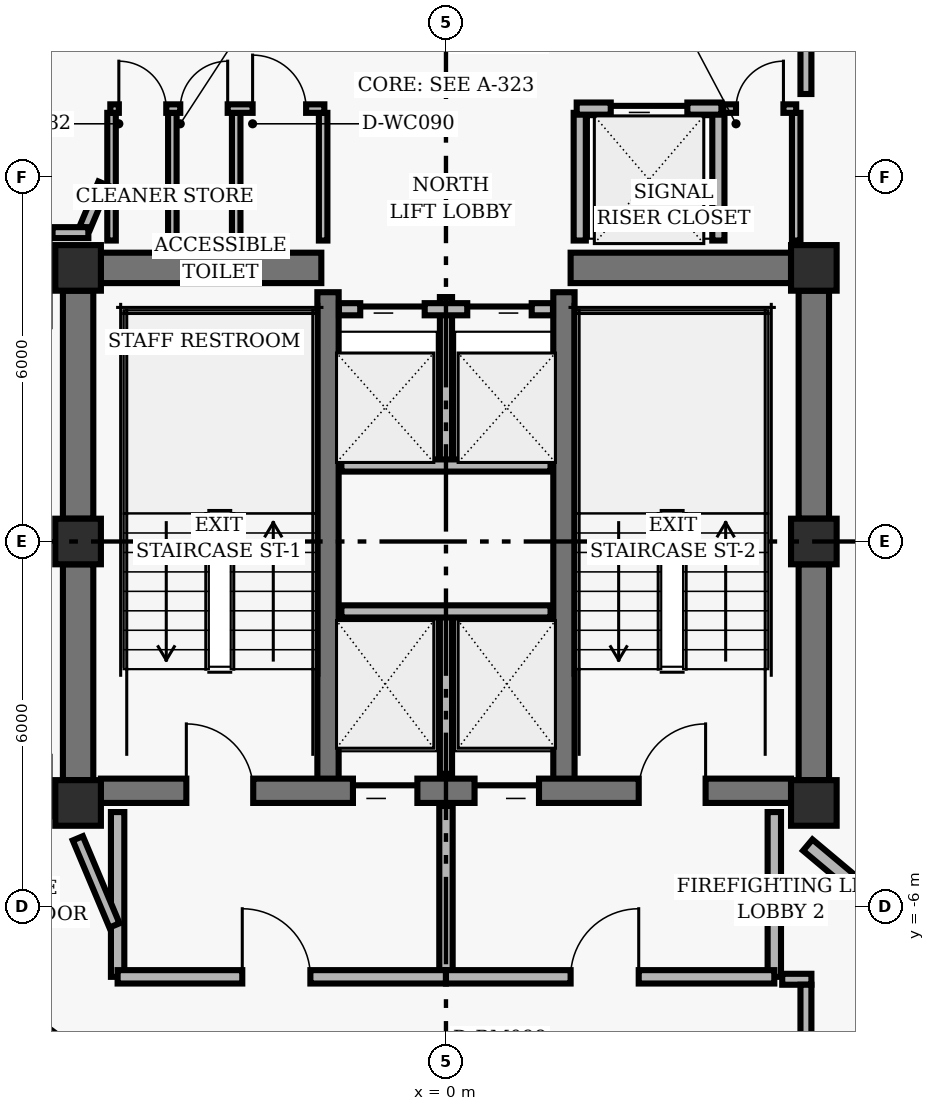
"""IFC4 building model, lengths in metres.
Left out: names, types, materials, properties, quantities, classifications, styles, units other than length and angle.
Written with IfcOpenShell. Run it as: python <this file> out.ifc"""

import sys

from ifc_helpers import new_model, si_unit, direction, frame, frame_2d, origin, origin_2d, place, context, subcontext, project, spatial, rectangle, hollow_rectangle, extrude, element, fill, save


model = new_model("IFC4")
c1 = context("Model", 3, precision=1e-05, world=origin(), true_north=direction((0.0, 1.0)))
c2 = subcontext(c1, "Body", "Model", "MODEL_VIEW")
j1 = project(units=[si_unit("LENGTHUNIT", "METRE"), si_unit("PLANEANGLEUNIT", "RADIAN")], contexts=[c1])
p1 = place(None, origin())
s1 = spatial("IfcSite", under=j1, at=p1, CompositionType="ELEMENT")
p2 = place(p1, origin())
s2 = spatial("IfcBuilding", under=s1, at=p2, CompositionType="ELEMENT")
p3 = place(p2, frame((0.0, 0.0, 236.16)))
s3 = spatial("IfcBuildingStorey", under=s2, at=p3, CompositionType="ELEMENT", Elevation=236.16)
for number, where, z_axis, x_axis in (
    (1, (-6.05, 4.5, 0.0), (0.0, 0.0, 1.0), (1.0, 0.0, 0.0)),
    (2, (6.05, 4.5, 0.0), (0.0, 0.0, 1.0), (1.0, 0.0, 0.0)),
    (3, (-6.05, 0.0, 0.0), (0.0, 0.0, 1.0), (1.0, 0.0, 0.0)),
    (4, (6.05, 0.0, 0.0), (0.0, 0.0, 1.0), (1.0, 0.0, 0.0)),
    (5, (-6.05, -4.3, 0.0), (0.0, 0.0, 1.0), (1.0, 0.0, 0.0)),
    (6, (6.05, -4.3, 0.0), (0.0, 0.0, 1.0), (1.0, 0.0, 0.0)),
):
    element("IfcColumn", number, at=place(p3, frame(where, z_axis=z_axis, x_axis=x_axis)), inside=s3, PredefinedType="COLUMN", context=c2, shape_type="SweptSolid", body=[
        extrude(hollow_rectangle(XDim=0.75, YDim=0.75, WallThickness=0.05, InnerFilletRadius=0.02, OuterFilletRadius=0.04, at=origin_2d()), origin(), (0.0, 0.0, 1.0), 3.04),
    ])
p4 = place(p3, frame((-6.05, 0.375, 0.0), z_axis=(0.0, 0.0, 1.0), x_axis=(0.0, 1.0, 0.0)))
e7 = element("IfcWall", 7, at=p4, inside=s3, PredefinedType="SHEAR", context=c2, shape_type="SweptSolid", body=[
    extrude(rectangle(XDim=3.75, YDim=0.5, at=frame_2d((1.875, 0.0))), origin(), (0.0, 0.0, 1.0), 2.618),
])
p5 = place(p3, frame((-6.05, -3.925, 0.0), z_axis=(0.0, 0.0, 1.0), x_axis=(0.0, 1.0, 0.0)))
e8 = element("IfcWall", 8, at=p5, inside=s3, PredefinedType="SHEAR", context=c2, shape_type="SweptSolid", body=[
    extrude(rectangle(XDim=3.55, YDim=0.5, at=frame_2d((1.775, 0.0))), origin(), (0.0, 0.0, 1.0), 2.618),
])
p6 = place(p3, frame((6.05, 0.375, 0.0), z_axis=(0.0, 0.0, 1.0), x_axis=(0.0, 1.0, 0.0)))
e9 = element("IfcWall", 9, at=p6, inside=s3, PredefinedType="SHEAR", context=c2, shape_type="SweptSolid", body=[
    extrude(rectangle(XDim=3.75, YDim=0.5, at=frame_2d((1.875, 0.0))), origin(), (0.0, 0.0, 1.0), 2.618),
])
p7 = place(p3, frame((6.05, -3.925, 0.0), z_axis=(0.0, 0.0, 1.0), x_axis=(0.0, 1.0, 0.0)))
e10 = element("IfcWall", 10, at=p7, inside=s3, PredefinedType="SHEAR", context=c2, shape_type="SweptSolid", body=[
    extrude(rectangle(XDim=3.55, YDim=0.5, at=frame_2d((1.775, 0.0))), origin(), (0.0, 0.0, 1.0), 2.618),
])
for number, where, z_axis, x_axis in (
    (11, (-1.94, -4.1, 0.0), (0.0, 0.0, 1.0), (0.0, 1.0, 0.0)),
    (12, (1.94, -4.1, 0.0), (0.0, 0.0, 1.0), (0.0, 1.0, 0.0)),
):
    element("IfcWall", number, at=place(p3, frame(where, z_axis=z_axis, x_axis=x_axis)), inside=s3, PredefinedType="SHEAR", context=c2, shape_type="SweptSolid", body=[
        extrude(rectangle(XDim=8.2, YDim=0.35, at=frame_2d((4.1, 0.0))), origin(), (0.0, 0.0, 1.0), 2.618),
    ])
p8 = place(p3, frame((-5.675, -4.1, 0.0), z_axis=(0.0, 0.0, 1.0), x_axis=(1.0, 0.0, 0.0)))
e13 = element("IfcWall", 13, at=p8, inside=s3, PredefinedType="SHEAR", context=c2, shape_type="SweptSolid", body=[
    extrude(rectangle(XDim=11.35, YDim=0.4, at=frame_2d((5.675, 0.0))), origin(), (0.0, 0.0, 1.0), 2.618),
])
p9 = place(p8, frame((1.405, 0.0, 0.0)))
e14 = element("IfcOpeningElement", 14, at=p9, cuts=e13, PredefinedType="OPENING", context=c2, shape_type="SweptSolid", body=[
    extrude(rectangle(XDim=1.1, YDim=2.04, at=frame_2d((0.55, 1.02))), frame((0.0, 0.21, 0.0), z_axis=(0.0, -1.0, 0.0), x_axis=(1.0, 0.0, 0.0)), (0.0, 0.0, 1.0), 0.42),
])
p10 = place(p8, frame((8.845, 0.0, 0.0)))
e15 = element("IfcOpeningElement", 15, at=p10, cuts=e13, PredefinedType="OPENING", context=c2, shape_type="SweptSolid", body=[
    extrude(rectangle(XDim=1.1, YDim=2.04, at=frame_2d((0.55, 1.02))), frame((0.0, 0.21, 0.0), z_axis=(0.0, -1.0, 0.0), x_axis=(1.0, 0.0, 0.0)), (0.0, 0.0, 1.0), 0.42),
])
p11 = place(p8, frame((4.145, 0.0, 0.0)))
e16 = element("IfcOpeningElement", 16, at=p11, cuts=e13, PredefinedType="OPENING", context=c2, shape_type="SweptSolid", body=[
    extrude(rectangle(XDim=1.06, YDim=2.04, at=frame_2d((0.53, 1.02))), frame((0.0, 0.21, 0.0), z_axis=(0.0, -1.0, 0.0), x_axis=(1.0, 0.0, 0.0)), (0.0, 0.0, 1.0), 0.42),
])
p12 = place(p8, frame((6.145, 0.0, 0.0)))
e17 = element("IfcOpeningElement", 17, at=p12, cuts=e13, PredefinedType="OPENING", context=c2, shape_type="SweptSolid", body=[
    extrude(rectangle(XDim=1.06, YDim=2.04, at=frame_2d((0.53, 1.02))), frame((0.0, 0.21, 0.0), z_axis=(0.0, -1.0, 0.0), x_axis=(1.0, 0.0, 0.0)), (0.0, 0.0, 1.0), 0.42),
])
for number, where, z_axis, x_axis in (
    (18, (-5.675, 4.5, 0.0), (0.0, 0.0, 1.0), (1.0, 0.0, 0.0)),
    (19, (2.05, 4.5, 0.0), (0.0, 0.0, 1.0), (1.0, 0.0, 0.0)),
):
    element("IfcWall", number, at=place(p3, frame(where, z_axis=z_axis, x_axis=x_axis)), inside=s3, PredefinedType="SHEAR", context=c2, shape_type="SweptSolid", body=[
        extrude(rectangle(XDim=3.625, YDim=0.5, at=frame_2d((1.812, 0.0))), origin(), (0.0, 0.0, 1.0), 2.618),
    ])
p13 = place(p3, frame((0.0, -3.82, 0.0), z_axis=(0.0, 0.0, 1.0), x_axis=(0.0, 1.0, 0.0)))
e20 = element("IfcWall", 20, at=p13, inside=s3, PredefinedType="PARTITIONING", context=c2, shape_type="SweptSolid", body=[
    extrude(rectangle(XDim=2.67, YDim=0.2, at=frame_2d((1.335, 0.0))), origin(), (0.0, 0.0, 1.0), 2.593),
])
p14 = place(p3, frame((-1.72, -1.15, 0.0), z_axis=(0.0, 0.0, 1.0), x_axis=(1.0, 0.0, 0.0)))
e21 = element("IfcWall", 21, at=p14, inside=s3, PredefinedType="PARTITIONING", context=c2, shape_type="SweptSolid", body=[
    extrude(rectangle(XDim=3.44, YDim=0.2, at=frame_2d((1.72, 0.0))), origin(), (0.0, 0.0, 1.0), 2.593),
])
for number, where, z_axis, x_axis in (
    (22, (-5.4, -7.16, 0.0), (0.0, 0.0, 1.0), (0.0, 1.0, 0.0)),
    (23, (5.4, -7.16, 0.0), (0.0, 0.0, 1.0), (0.0, 1.0, 0.0)),
):
    element("IfcWall", number, at=place(p3, frame(where, z_axis=z_axis, x_axis=x_axis)), inside=s3, PredefinedType="PARTITIONING", context=c2, shape_type="SweptSolid", body=[
        extrude(rectangle(XDim=2.71, YDim=0.22, at=frame_2d((1.355, 0.0))), origin(), (0.0, 0.0, 1.0), 2.593),
    ])
p15 = place(p3, frame((0.0, -7.16, 0.0), z_axis=(0.0, 0.0, 1.0), x_axis=(0.0, 1.0, 0.0)))
e24 = element("IfcWall", 24, at=p15, inside=s3, PredefinedType="PARTITIONING", context=c2, shape_type="SweptSolid", body=[
    extrude(rectangle(XDim=2.81, YDim=0.22, at=frame_2d((1.405, 0.0))), origin(), (0.0, 0.0, 1.0), 2.593),
])
p16 = place(p3, frame((-5.4, -7.16, 0.0), z_axis=(0.0, 0.0, 1.0), x_axis=(1.0, 0.0, 0.0)))
e25 = element("IfcWall", 25, at=p16, inside=s3, PredefinedType="PARTITIONING", context=c2, shape_type="SweptSolid", body=[
    extrude(rectangle(XDim=5.4, YDim=0.22, at=frame_2d((2.7, 0.0))), origin(), (0.0, 0.0, 1.0), 2.215),
])
p17 = place(p16, frame((2.05, 0.0, 0.0)))
e26 = element("IfcOpeningElement", 26, at=p17, cuts=e25, PredefinedType="OPENING", context=c2, shape_type="SweptSolid", body=[
    extrude(rectangle(XDim=1.12, YDim=2.02, at=frame_2d((0.56, 1.01))), frame((0.0, 0.12, 0.0), z_axis=(0.0, -1.0, 0.0), x_axis=(1.0, 0.0, 0.0)), (0.0, 0.0, 1.0), 0.24),
])
p18 = place(p3, frame((0.0, -7.16, 0.0), z_axis=(0.0, 0.0, 1.0), x_axis=(1.0, 0.0, 0.0)))
e27 = element("IfcWall", 27, at=p18, inside=s3, PredefinedType="PARTITIONING", context=c2, shape_type="SweptSolid", body=[
    extrude(rectangle(XDim=5.4, YDim=0.22, at=frame_2d((2.7, 0.0))), origin(), (0.0, 0.0, 1.0), 2.593),
])
p19 = place(p18, frame((2.05, 0.0, 0.0)))
e28 = element("IfcOpeningElement", 28, at=p19, cuts=e27, PredefinedType="OPENING", context=c2, shape_type="SweptSolid", body=[
    extrude(rectangle(XDim=1.12, YDim=2.02, at=frame_2d((0.56, 1.01))), frame((0.0, 0.12, 0.0), z_axis=(0.0, -1.0, 0.0), x_axis=(1.0, 0.0, 0.0)), (0.0, 0.0, 1.0), 0.24),
])
p20 = place(p3, frame((0.0, 1.25, 0.0), z_axis=(0.0, 0.0, 1.0), x_axis=(0.0, 1.0, 0.0)))
e29 = element("IfcWall", 29, at=p20, inside=s3, PredefinedType="PARTITIONING", context=c2, shape_type="SweptSolid", body=[
    extrude(rectangle(XDim=2.77, YDim=0.2, at=frame_2d((1.385, 0.0))), origin(), (0.0, 0.0, 1.0), 2.593),
])
p21 = place(p3, frame((-1.72, 1.25, 0.0), z_axis=(0.0, 0.0, 1.0), x_axis=(1.0, 0.0, 0.0)))
e30 = element("IfcWall", 30, at=p21, inside=s3, PredefinedType="PARTITIONING", context=c2, shape_type="SweptSolid", body=[
    extrude(rectangle(XDim=3.44, YDim=0.2, at=frame_2d((1.72, 0.0))), origin(), (0.0, 0.0, 1.0), 2.593),
])
p22 = place(p3, frame((-1.76, 3.82, 0.0), z_axis=(0.0, 0.0, 1.0), x_axis=(1.0, 0.0, 0.0)))
e31 = element("IfcWall", 31, at=p22, inside=s3, PredefinedType="PARTITIONING", context=c2, shape_type="SweptSolid", body=[
    extrude(rectangle(XDim=3.52, YDim=0.2, at=frame_2d((1.76, 0.0))), origin(), (0.0, 0.0, 1.0), 2.593),
])
p23 = place(p22, frame((0.35, 0.0, 0.0)))
e32 = element("IfcOpeningElement", 32, at=p23, cuts=e31, PredefinedType="OPENING", context=c2, shape_type="SweptSolid", body=[
    extrude(rectangle(XDim=1.06, YDim=2.04, at=frame_2d((0.53, 1.02))), frame((0.0, 0.11, 0.0), z_axis=(0.0, -1.0, 0.0), x_axis=(1.0, 0.0, 0.0)), (0.0, 0.0, 1.0), 0.22),
])
p24 = place(p22, frame((2.11, 0.0, 0.0)))
e33 = element("IfcOpeningElement", 33, at=p24, cuts=e31, PredefinedType="OPENING", context=c2, shape_type="SweptSolid", body=[
    extrude(rectangle(XDim=1.06, YDim=2.04, at=frame_2d((0.53, 1.02))), frame((0.0, 0.11, 0.0), z_axis=(0.0, -1.0, 0.0), x_axis=(1.0, 0.0, 0.0)), (0.0, 0.0, 1.0), 0.22),
])
for number, where, z_axis, x_axis in (
    (34, (2.2, 4.95, 0.0), (0.0, 0.0, 1.0), (0.0, 1.0, 0.0)),
    (35, (4.48, 4.95, 0.0), (0.0, 0.0, 1.0), (0.0, 1.0, 0.0)),
):
    element("IfcWall", number, at=place(p3, frame(where, z_axis=z_axis, x_axis=x_axis)), inside=s3, PredefinedType="PARTITIONING", context=c2, shape_type="SweptSolid", body=[
        extrude(rectangle(XDim=2.1, YDim=0.2, at=frame_2d((1.05, 0.0))), origin(), (0.0, 0.0, 1.0), 2.593),
    ])
p25 = place(p3, frame((2.15, 7.12, 0.0), z_axis=(0.0, 0.0, 1.0), x_axis=(1.0, 0.0, 0.0)))
e36 = element("IfcWall", 36, at=p25, inside=s3, PredefinedType="PARTITIONING", context=c2, shape_type="SweptSolid", body=[
    extrude(rectangle(XDim=2.38, YDim=0.2, at=frame_2d((1.19, 0.0))), origin(), (0.0, 0.0, 1.0), 2.215),
])
p26 = place(p25, frame((0.56, 0.0, 0.0)))
e37 = element("IfcOpeningElement", 37, at=p26, cuts=e36, PredefinedType="OPENING", context=c2, shape_type="SweptSolid", body=[
    extrude(rectangle(XDim=1.26, YDim=2.06, at=frame_2d((0.63, 1.03))), frame((0.0, 0.11, 0.0), z_axis=(0.0, -1.0, 0.0), x_axis=(1.0, 0.0, 0.0)), (0.0, 0.0, 1.0), 0.22),
])
for number, where, z_axis, x_axis in (
    (38, (-5.5, 4.95, 0.0), (0.0, 0.0, 1.0), (0.0, 1.0, 0.0)),
    (39, (-4.5, 4.95, 0.0), (0.0, 0.0, 1.0), (0.0, 1.0, 0.0)),
    (40, (-3.45, 4.95, 0.0), (0.0, 0.0, 1.0), (0.0, 1.0, 0.0)),
    (41, (-2.02, 4.95, 0.0), (0.0, 0.0, 1.0), (0.0, 1.0, 0.0)),
):
    element("IfcWall", number, at=place(p3, frame(where, z_axis=z_axis, x_axis=x_axis)), inside=s3, PredefinedType="PARTITIONING", context=c2, shape_type="SweptSolid", body=[
        extrude(rectangle(XDim=2.1, YDim=0.14, at=frame_2d((1.05, 0.0))), origin(), (0.0, 0.0, 1.0), 2.593),
    ])
p27 = place(p3, frame((-5.52, 7.12, 0.0), z_axis=(0.0, 0.0, 1.0), x_axis=(1.0, 0.0, 0.0)))
e42 = element("IfcWall", 42, at=p27, inside=s3, PredefinedType="PARTITIONING", context=c2, shape_type="SweptSolid", body=[
    extrude(rectangle(XDim=3.52, YDim=0.14, at=frame_2d((1.76, 0.0))), origin(), (0.0, 0.0, 1.0), 2.215),
])
p28 = place(p27, frame((0.14, 0.0, 0.0)))
e43 = element("IfcOpeningElement", 43, at=p28, cuts=e42, PredefinedType="OPENING", context=c2, shape_type="SweptSolid", body=[
    extrude(rectangle(XDim=0.78, YDim=2.01, at=frame_2d((0.39, 1.005))), frame((0.0, 0.08, 0.0), z_axis=(0.0, -1.0, 0.0), x_axis=(1.0, 0.0, 0.0)), (0.0, 0.0, 1.0), 0.16),
])
p29 = place(p27, frame((1.15, 0.0, 0.0)))
e44 = element("IfcOpeningElement", 44, at=p29, cuts=e42, PredefinedType="OPENING", context=c2, shape_type="SweptSolid", body=[
    extrude(rectangle(XDim=0.78, YDim=2.01, at=frame_2d((0.39, 1.005))), frame((0.0, 0.08, 0.0), z_axis=(0.0, -1.0, 0.0), x_axis=(1.0, 0.0, 0.0)), (0.0, 0.0, 1.0), 0.16),
])
p30 = place(p27, frame((2.34, 0.0, 0.0)))
e45 = element("IfcOpeningElement", 45, at=p30, cuts=e42, PredefinedType="OPENING", context=c2, shape_type="SweptSolid", body=[
    extrude(rectangle(XDim=0.88, YDim=2.02, at=frame_2d((0.44, 1.01))), frame((0.0, 0.08, 0.0), z_axis=(0.0, -1.0, 0.0), x_axis=(1.0, 0.0, 0.0)), (0.0, 0.0, 1.0), 0.16),
])
p31 = place(p3, frame((5.76, 4.95, 0.0), z_axis=(0.0, 0.0, 1.0), x_axis=(0.0, 1.0, 0.0)))
e46 = element("IfcWall", 46, at=p31, inside=s3, PredefinedType="PARTITIONING", context=c2, shape_type="SweptSolid", body=[
    extrude(rectangle(XDim=2.1, YDim=0.14, at=frame_2d((1.05, 0.0))), origin(), (0.0, 0.0, 1.0), 2.593),
])
p32 = place(p3, frame((4.56, 7.12, 0.0), z_axis=(0.0, 0.0, 1.0), x_axis=(1.0, 0.0, 0.0)))
e47 = element("IfcWall", 47, at=p32, inside=s3, PredefinedType="PARTITIONING", context=c2, shape_type="SweptSolid", body=[
    extrude(rectangle(XDim=1.2, YDim=0.14, at=frame_2d((0.6, 0.0))), origin(), (0.0, 0.0, 1.0), 2.593),
])
p33 = place(p32, frame((0.21, 0.0, 0.0)))
e48 = element("IfcOpeningElement", 48, at=p33, cuts=e47, PredefinedType="OPENING", context=c2, shape_type="SweptSolid", body=[
    extrude(rectangle(XDim=0.78, YDim=2.01, at=frame_2d((0.39, 1.005))), frame((0.0, 0.08, 0.0), z_axis=(0.0, -1.0, 0.0), x_axis=(1.0, 0.0, 0.0)), (0.0, 0.0, 1.0), 0.16),
])
p34 = place(p3, frame((5.92, 9.16, 0.0), z_axis=(0.0, 0.0, 1.0), x_axis=(0.0, -1.0, 0.0)))
e49 = element("IfcWall", 49, at=p34, inside=s3, PredefinedType="PARTITIONING", context=c2, shape_type="SweptSolid", body=[
    extrude(rectangle(XDim=1.8, YDim=0.18, at=frame_2d((0.9, 0.0))), origin(), (0.0, 0.0, 1.0), 2.593),
])
p35 = place(p3, frame((-5.632, 5.887, 0.0), z_axis=(0.0, 0.0, 1.0), x_axis=(-0.387792833522, -0.921746558588, 0.0)))
e50 = element("IfcWall", 50, at=p35, inside=s3, PredefinedType="PARTITIONING", context=c2, shape_type="SweptSolid", body=[
    extrude(rectangle(XDim=0.785, YDim=0.18, at=frame_2d((0.393, 0.0))), origin(), (0.0, 0.0, 1.0), 2.593),
])
p36 = place(p3, frame((-5.881, 5.08, 0.0), z_axis=(0.0, 0.0, 1.0), x_axis=(-1.0, 0.0, 0.0)))
e51 = element("IfcWall", 51, at=p36, inside=s3, PredefinedType="PARTITIONING", context=c2, shape_type="SweptSolid", body=[
    extrude(rectangle(XDim=0.589, YDim=0.18, at=frame_2d((0.294, 0.0))), origin(), (0.0, 0.0, 1.0), 2.593),
])
p37 = place(p3, frame((-6.055, -4.882, 0.0), z_axis=(0.0, 0.0, 1.0), x_axis=(0.387579540458, -0.921836265189, 0.0)))
e52 = element("IfcWall", 52, at=p37, inside=s3, PredefinedType="PARTITIONING", context=c2, shape_type="SweptSolid", body=[
    extrude(rectangle(XDim=1.555, YDim=0.18, at=frame_2d((0.777, 0.0))), origin(), (0.0, 0.0, 1.0), 2.073),
])
p38 = place(p3, frame((5.53, -7.2, 0.0), z_axis=(0.0, 0.0, 1.0), x_axis=(1.0, 0.0, 0.0)))
e53 = element("IfcWall", 53, at=p38, inside=s3, PredefinedType="PARTITIONING", context=c2, shape_type="SweptSolid", body=[
    extrude(rectangle(XDim=0.48, YDim=0.18, at=frame_2d((0.24, 0.0))), origin(), (0.0, 0.0, 1.0), 2.593),
])
p39 = place(p3, frame((5.92, -7.29, 0.0), z_axis=(0.0, 0.0, 1.0), x_axis=(0.0, -1.0, 0.0)))
e54 = element("IfcWall", 54, at=p39, inside=s3, PredefinedType="PARTITIONING", context=c2, shape_type="SweptSolid", body=[
    extrude(rectangle(XDim=1.82, YDim=0.18, at=frame_2d((0.91, 0.0))), origin(), (0.0, 0.0, 1.0), 2.073),
])
p40 = place(p3, frame((5.95, -4.993, 0.0), z_axis=(0.0, 0.0, 1.0), x_axis=(0.766055051894, -0.642774966428, 0.0)))
e55 = element("IfcWall", 55, at=p40, inside=s3, PredefinedType="PARTITIONING", context=c2, shape_type="SweptSolid", body=[
    extrude(rectangle(XDim=6.137, YDim=0.24, at=frame_2d((3.069, 0.0))), origin(), (0.0, 0.0, 1.0), 2.593),
])
p41 = place(p9, origin())
e56 = element("IfcDoor", 56, at=p41, inside=s3, OperationType="SINGLE_SWING_LEFT", PredefinedType="DOOR", context=c2, shape_type="SweptSolid", body=[
    extrude(rectangle(XDim=1.1, YDim=2.04, at=frame_2d((0.55, 1.02))), frame((0.0, 0.025, 0.0), z_axis=(0.0, -1.0, 0.0), x_axis=(1.0, 0.0, 0.0)), (0.0, 0.0, 1.0), 0.05),
])
fill(e14, e56)
p42 = place(p10, origin())
e57 = element("IfcDoor", 57, at=p42, inside=s3, OperationType="SINGLE_SWING_RIGHT", PredefinedType="DOOR", context=c2, shape_type="SweptSolid", body=[
    extrude(rectangle(XDim=1.1, YDim=2.04, at=frame_2d((0.55, 1.02))), frame((0.0, 0.025, 0.0), z_axis=(0.0, -1.0, 0.0), x_axis=(1.0, 0.0, 0.0)), (0.0, 0.0, 1.0), 0.05),
])
fill(e15, e57)
p43 = place(p11, origin())
e58 = element("IfcDoor", 58, at=p43, inside=s3, OperationType="SLIDING_TO_LEFT", PredefinedType="DOOR", context=c2, shape_type="SweptSolid", body=[
    extrude(rectangle(XDim=1.06, YDim=2.04, at=frame_2d((0.53, 1.02))), frame((0.0, 0.025, 0.0), z_axis=(0.0, -1.0, 0.0), x_axis=(1.0, 0.0, 0.0)), (0.0, 0.0, 1.0), 0.05),
])
fill(e16, e58)
p44 = place(p12, origin())
e59 = element("IfcDoor", 59, at=p44, inside=s3, OperationType="SLIDING_TO_RIGHT", PredefinedType="DOOR", context=c2, shape_type="SweptSolid", body=[
    extrude(rectangle(XDim=1.06, YDim=2.04, at=frame_2d((0.53, 1.02))), frame((0.0, 0.025, 0.0), z_axis=(0.0, -1.0, 0.0), x_axis=(1.0, 0.0, 0.0)), (0.0, 0.0, 1.0), 0.05),
])
fill(e17, e59)
p45 = place(p17, origin())
e60 = element("IfcDoor", 60, at=p45, inside=s3, OperationType="SINGLE_SWING_LEFT", PredefinedType="DOOR", context=c2, shape_type="SweptSolid", body=[
    extrude(rectangle(XDim=1.12, YDim=2.02, at=frame_2d((0.56, 1.01))), frame((0.0, 0.025, 0.0), z_axis=(0.0, -1.0, 0.0), x_axis=(1.0, 0.0, 0.0)), (0.0, 0.0, 1.0), 0.05),
])
fill(e26, e60)
p46 = place(p19, origin())
e61 = element("IfcDoor", 61, at=p46, inside=s3, OperationType="SINGLE_SWING_RIGHT", PredefinedType="DOOR", context=c2, shape_type="SweptSolid", body=[
    extrude(rectangle(XDim=1.12, YDim=2.02, at=frame_2d((0.56, 1.01))), frame((0.0, 0.025, 0.0), z_axis=(0.0, -1.0, 0.0), x_axis=(1.0, 0.0, 0.0)), (0.0, 0.0, 1.0), 0.05),
])
fill(e28, e61)
p47 = place(p23, origin())
e62 = element("IfcDoor", 62, at=p47, inside=s3, OperationType="SLIDING_TO_LEFT", PredefinedType="DOOR", context=c2, shape_type="SweptSolid", body=[
    extrude(rectangle(XDim=1.06, YDim=2.04, at=frame_2d((0.53, 1.02))), frame((0.0, 0.025, 0.0), z_axis=(0.0, -1.0, 0.0), x_axis=(1.0, 0.0, 0.0)), (0.0, 0.0, 1.0), 0.05),
])
fill(e32, e62)
p48 = place(p24, origin())
e63 = element("IfcDoor", 63, at=p48, inside=s3, OperationType="SLIDING_TO_RIGHT", PredefinedType="DOOR", context=c2, shape_type="SweptSolid", body=[
    extrude(rectangle(XDim=1.06, YDim=2.04, at=frame_2d((0.53, 1.02))), frame((0.0, 0.025, 0.0), z_axis=(0.0, -1.0, 0.0), x_axis=(1.0, 0.0, 0.0)), (0.0, 0.0, 1.0), 0.05),
])
fill(e33, e63)
p49 = place(p26, origin())
e64 = element("IfcDoor", 64, at=p49, inside=s3, OperationType="SLIDING_TO_LEFT", PredefinedType="DOOR", context=c2, shape_type="SweptSolid", body=[
    extrude(rectangle(XDim=1.26, YDim=2.06, at=frame_2d((0.63, 1.03))), frame((0.0, 0.025, 0.0), z_axis=(0.0, -1.0, 0.0), x_axis=(1.0, 0.0, 0.0)), (0.0, 0.0, 1.0), 0.05),
])
fill(e37, e64)
p50 = place(p28, origin())
e65 = element("IfcDoor", 65, at=p50, inside=s3, OperationType="SINGLE_SWING_LEFT", PredefinedType="DOOR", context=c2, shape_type="SweptSolid", body=[
    extrude(rectangle(XDim=0.78, YDim=2.01, at=frame_2d((0.39, 1.005))), frame((0.0, 0.025, 0.0), z_axis=(0.0, -1.0, 0.0), x_axis=(1.0, 0.0, 0.0)), (0.0, 0.0, 1.0), 0.05),
])
fill(e43, e65)
p51 = place(p29, origin())
e66 = element("IfcDoor", 66, at=p51, inside=s3, OperationType="SINGLE_SWING_RIGHT", PredefinedType="DOOR", context=c2, shape_type="SweptSolid", body=[
    extrude(rectangle(XDim=0.78, YDim=2.01, at=frame_2d((0.39, 1.005))), frame((0.0, 0.025, 0.0), z_axis=(0.0, -1.0, 0.0), x_axis=(1.0, 0.0, 0.0)), (0.0, 0.0, 1.0), 0.05),
])
fill(e44, e66)
p52 = place(p30, origin())
e67 = element("IfcDoor", 67, at=p52, inside=s3, OperationType="SINGLE_SWING_LEFT", PredefinedType="DOOR", context=c2, shape_type="SweptSolid", body=[
    extrude(rectangle(XDim=0.88, YDim=2.02, at=frame_2d((0.44, 1.01))), frame((0.0, 0.025, 0.0), z_axis=(0.0, -1.0, 0.0), x_axis=(1.0, 0.0, 0.0)), (0.0, 0.0, 1.0), 0.05),
])
fill(e45, e67)
p53 = place(p33, origin())
e68 = element("IfcDoor", 68, at=p53, inside=s3, OperationType="SINGLE_SWING_RIGHT", PredefinedType="DOOR", context=c2, shape_type="SweptSolid", body=[
    extrude(rectangle(XDim=0.78, YDim=2.01, at=frame_2d((0.39, 1.005))), frame((0.0, 0.025, 0.0), z_axis=(0.0, -1.0, 0.0), x_axis=(1.0, 0.0, 0.0)), (0.0, 0.0, 1.0), 0.05),
])
fill(e48, e68)
save(model, sys.argv[1])
